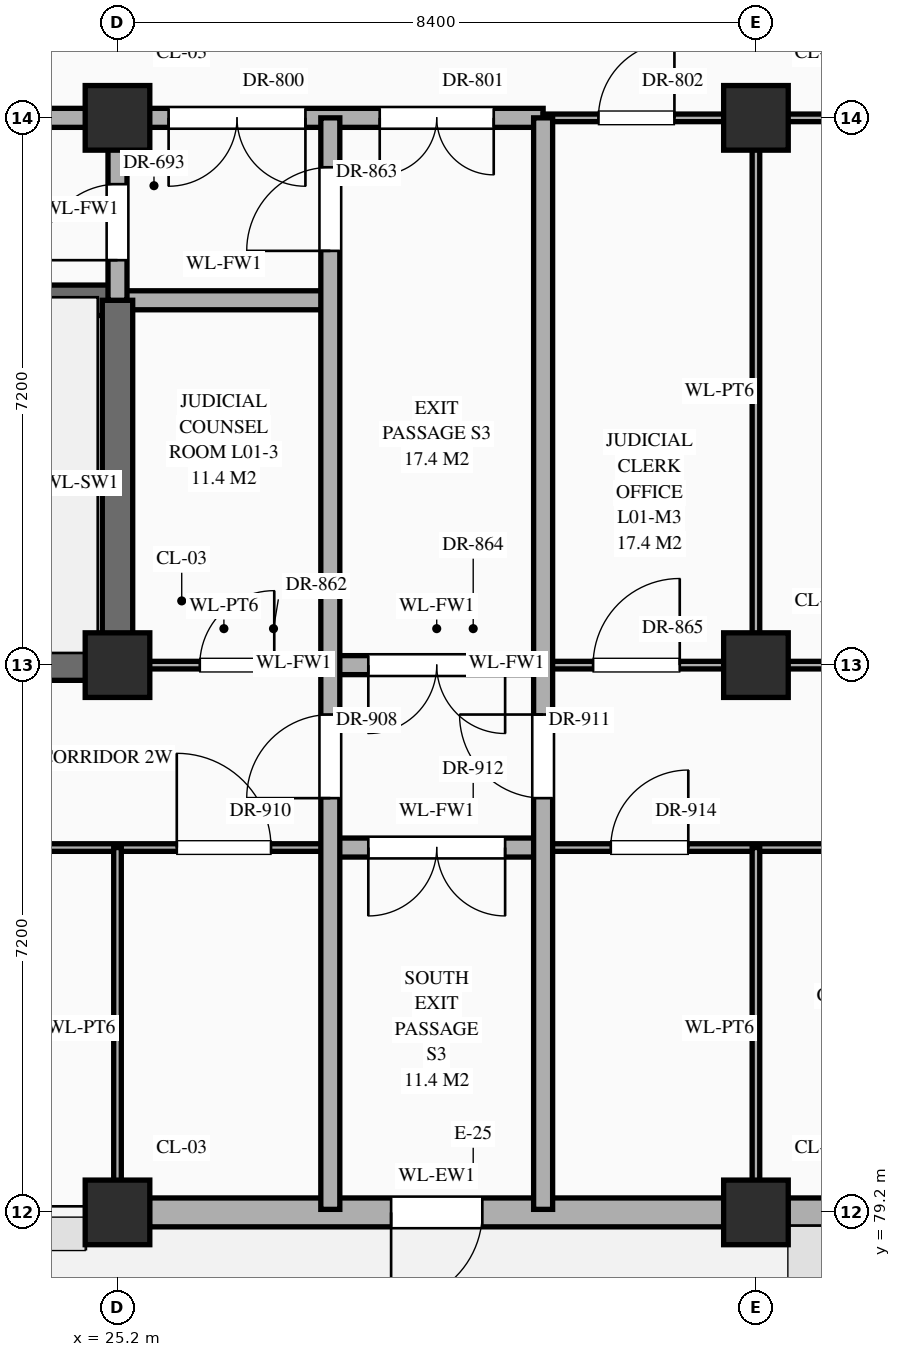
"""IFC4 building model, lengths in metres.
Left out: names, types, materials, properties, quantities, classifications, styles, units other than length and angle.
Written with IfcOpenShell. Run it as: python <this file> out.ifc"""

import sys

from ifc_helpers import new_model, si_unit, direction, frame, frame_2d, origin, origin_2d, place, context, subcontext, project, spatial, rectangle, extrude, element, fill, save


model = new_model("IFC4")
c1 = context("Model", 3, precision=1e-05, world=origin(), true_north=direction((0.0, 1.0)))
c2 = subcontext(c1, "Body", "Model", "MODEL_VIEW")
j1 = project(units=[si_unit("LENGTHUNIT", "METRE"), si_unit("PLANEANGLEUNIT", "RADIAN")], contexts=[c1])
p1 = place(None, origin())
s1 = spatial("IfcSite", under=j1, at=p1, CompositionType="ELEMENT")
p2 = place(p1, origin())
s2 = spatial("IfcBuilding", under=s1, at=p2, CompositionType="ELEMENT")
p3 = place(p2, origin())
s3 = spatial("IfcBuildingStorey", under=s2, at=p3, CompositionType="ELEMENT", Elevation=0.0)
for number, where, z_axis, x_axis in (
    (1, (25.2, 79.2, 0.0), (0.0, 0.0, 1.0), (1.0, 0.0, 0.0)),
    (2, (25.2, 86.4, 0.0), (0.0, 0.0, 1.0), (1.0, 0.0, 0.0)),
    (3, (25.2, 93.6, 0.0), (0.0, 0.0, 1.0), (1.0, 0.0, 0.0)),
    (4, (33.6, 79.2, 0.0), (0.0, 0.0, 1.0), (1.0, 0.0, 0.0)),
    (5, (33.6, 86.4, 0.0), (0.0, 0.0, 1.0), (1.0, 0.0, 0.0)),
    (6, (33.6, 93.6, 0.0), (0.0, 0.0, 1.0), (1.0, 0.0, 0.0)),
):
    element("IfcColumn", number, at=place(p3, frame(where, z_axis=z_axis, x_axis=x_axis)), inside=s3, PredefinedType="COLUMN", context=c2, shape_type="SweptSolid", body=[
        extrude(rectangle(XDim=0.85, YDim=0.85, at=origin_2d()), origin(), (0.0, 0.0, 1.0), 5.4),
    ])
p4 = place(p3, frame((25.62, 79.2, 0.0), z_axis=(0.0, 0.0, 1.0), x_axis=(1.0, 0.0, 0.0)))
e7 = element("IfcWall", 7, at=p4, inside=s3, PredefinedType="STANDARD", context=c2, shape_type="SweptSolid", body=[
    extrude(rectangle(XDim=7.56, YDim=0.38, at=frame_2d((3.78, 0.0))), origin(), (0.0, 0.0, 1.0), 4.47),
])
p5 = place(p4, frame((3.18, 0.0, 0.0)))
e8 = element("IfcOpeningElement", 8, at=p5, cuts=e7, PredefinedType="OPENING", context=c2, shape_type="SweptSolid", body=[
    extrude(rectangle(XDim=1.2, YDim=2.2, at=frame_2d((0.6, 1.1))), frame((0.0, 0.202, 0.0), z_axis=(0.0, -1.0, 0.0), x_axis=(1.0, 0.0, 0.0)), (0.0, 0.0, 1.0), 0.404),
])
p6 = place(p3, frame((34.02, 79.2, 0.0), z_axis=(0.0, 0.0, 1.0), x_axis=(1.0, 0.0, 0.0)))
e9 = element("IfcWall", 9, at=p6, inside=s3, PredefinedType="STANDARD", context=c2, shape_type="SweptSolid", body=[
    extrude(rectangle(XDim=7.56, YDim=0.38, at=frame_2d((3.78, 0.0))), origin(), (0.0, 0.0, 1.0), 4.47),
])
p7 = place(p6, frame((2.58, 0.0, 0.0)))
e10 = element("IfcOpeningElement", 10, at=p7, cuts=e9, PredefinedType="OPENING", context=c2, shape_type="SweptSolid", body=[
    extrude(rectangle(XDim=2.4, YDim=2.4, at=frame_2d((1.2, 1.2))), frame((0.0, 0.202, 0.0), z_axis=(0.0, -1.0, 0.0), x_axis=(1.0, 0.0, 0.0)), (0.0, 0.0, 1.0), 0.404),
])
p8 = place(p3, frame((16.8, 84.0, 0.0), z_axis=(0.0, 0.0, 1.0), x_axis=(1.0, 0.0, 0.0)))
e11 = element("IfcWall", 11, at=p8, inside=s3, PredefinedType="STANDARD", context=c2, shape_type="SweptSolid", body=[
    extrude(rectangle(XDim=11.2, YDim=0.1, at=frame_2d((5.6, 0.0))), origin(), (0.0, 0.0, 1.0), 5.12),
])
p9 = place(p8, frame((3.6, 0.0, 0.0)))
e12 = element("IfcOpeningElement", 12, at=p9, cuts=e11, PredefinedType="OPENING", context=c2, shape_type="SweptSolid", body=[
    extrude(rectangle(XDim=1.2, YDim=2.35, at=frame_2d((0.6, 1.175))), frame((0.0, 0.062, 0.0), z_axis=(0.0, -1.0, 0.0), x_axis=(1.0, 0.0, 0.0)), (0.0, 0.0, 1.0), 0.124),
])
p10 = place(p8, frame((9.18, 0.0, 0.0)))
e13 = element("IfcOpeningElement", 13, at=p10, cuts=e11, PredefinedType="OPENING", context=c2, shape_type="SweptSolid", body=[
    extrude(rectangle(XDim=1.24, YDim=2.3, at=frame_2d((0.62, 1.15))), frame((0.0, 0.062, 0.0), z_axis=(0.0, -1.0, 0.0), x_axis=(1.0, 0.0, 0.0)), (0.0, 0.0, 1.0), 0.124),
])
p11 = place(p3, frame((28.0, 84.0, 0.0), z_axis=(0.0, 0.0, 1.0), x_axis=(1.0, 0.0, 0.0)))
e14 = element("IfcWall", 14, at=p11, inside=s3, PredefinedType="STANDARD", context=c2, shape_type="SweptSolid", body=[
    extrude(rectangle(XDim=2.8, YDim=0.25, at=frame_2d((1.4, 0.0))), origin(), (0.0, 0.0, 1.0), 5.12),
])
p12 = place(p11, frame((0.5, 0.0, 0.0)))
e15 = element("IfcOpeningElement", 15, at=p12, cuts=e14, PredefinedType="OPENING", context=c2, shape_type="SweptSolid", body=[
    extrude(rectangle(XDim=1.8, YDim=2.35, at=frame_2d((0.9, 1.175))), frame((0.0, 0.137, 0.0), z_axis=(0.0, -1.0, 0.0), x_axis=(1.0, 0.0, 0.0)), (0.0, 0.0, 1.0), 0.274),
])
p13 = place(p3, frame((30.8, 84.0, 0.0), z_axis=(0.0, 0.0, 1.0), x_axis=(1.0, 0.0, 0.0)))
e16 = element("IfcWall", 16, at=p13, inside=s3, PredefinedType="STANDARD", context=c2, shape_type="SweptSolid", body=[
    extrude(rectangle(XDim=22.4, YDim=0.1, at=frame_2d((11.2, 0.0))), origin(), (0.0, 0.0, 1.0), 5.12),
])
p14 = place(p13, frame((0.89, 0.0, 0.0)))
e17 = element("IfcOpeningElement", 17, at=p14, cuts=e16, PredefinedType="OPENING", context=c2, shape_type="SweptSolid", body=[
    extrude(rectangle(XDim=1.02, YDim=2.4, at=frame_2d((0.51, 1.2))), frame((0.0, 0.062, 0.0), z_axis=(0.0, -1.0, 0.0), x_axis=(1.0, 0.0, 0.0)), (0.0, 0.0, 1.0), 0.124),
])
p15 = place(p13, frame((10.475, 0.0, 0.0)))
e18 = element("IfcOpeningElement", 18, at=p15, cuts=e16, PredefinedType="OPENING", context=c2, shape_type="SweptSolid", body=[
    extrude(rectangle(XDim=1.45, YDim=2.3, at=frame_2d((0.725, 1.15))), frame((0.0, 0.062, 0.0), z_axis=(0.0, -1.0, 0.0), x_axis=(1.0, 0.0, 0.0)), (0.0, 0.0, 1.0), 0.124),
])
p16 = place(p13, frame((20.55, 0.0, 0.0)))
e19 = element("IfcOpeningElement", 19, at=p16, cuts=e16, PredefinedType="OPENING", context=c2, shape_type="SweptSolid", body=[
    extrude(rectangle(XDim=0.9, YDim=2.15, at=frame_2d((0.45, 1.075))), frame((0.0, 0.062, 0.0), z_axis=(0.0, -1.0, 0.0), x_axis=(1.0, 0.0, 0.0)), (0.0, 0.0, 1.0), 0.124),
])
p17 = place(p3, frame((16.8, 86.4, 0.0), z_axis=(0.0, 0.0, 1.0), x_axis=(1.0, 0.0, 0.0)))
e20 = element("IfcWall", 20, at=p17, inside=s3, PredefinedType="SHEAR", context=c2, shape_type="SweptSolid", body=[
    extrude(rectangle(XDim=8.4, YDim=0.4, at=frame_2d((4.2, 0.0))), origin(), (0.0, 0.0, 1.0), 5.12),
])
p18 = place(p3, frame((25.2, 86.4, 0.0), z_axis=(0.0, 0.0, 1.0), x_axis=(1.0, 0.0, 0.0)))
e21 = element("IfcWall", 21, at=p18, inside=s3, PredefinedType="STANDARD", context=c2, shape_type="SweptSolid", body=[
    extrude(rectangle(XDim=2.8, YDim=0.1, at=frame_2d((1.4, 0.0))), origin(), (0.0, 0.0, 1.0), 4.27),
])
p19 = place(p18, frame((1.083, 0.0, 0.0)))
e22 = element("IfcOpeningElement", 22, at=p19, cuts=e21, PredefinedType="OPENING", context=c2, shape_type="SweptSolid", body=[
    extrude(rectangle(XDim=0.98, YDim=2.35, at=frame_2d((0.49, 1.175))), frame((0.0, 0.062, 0.0), z_axis=(0.0, -1.0, 0.0), x_axis=(1.0, 0.0, 0.0)), (0.0, 0.0, 1.0), 0.124),
])
p20 = place(p3, frame((28.0, 86.4, 0.0), z_axis=(0.0, 0.0, 1.0), x_axis=(1.0, 0.0, 0.0)))
e23 = element("IfcWall", 23, at=p20, inside=s3, PredefinedType="STANDARD", context=c2, shape_type="SweptSolid", body=[
    extrude(rectangle(XDim=2.8, YDim=0.25, at=frame_2d((1.4, 0.0))), origin(), (0.0, 0.0, 1.0), 4.27),
])
p21 = place(p20, frame((0.5, 0.0, 0.0)))
e24 = element("IfcOpeningElement", 24, at=p21, cuts=e23, PredefinedType="OPENING", context=c2, shape_type="SweptSolid", body=[
    extrude(rectangle(XDim=1.8, YDim=2.35, at=frame_2d((0.9, 1.175))), frame((0.0, 0.137, 0.0), z_axis=(0.0, -1.0, 0.0), x_axis=(1.0, 0.0, 0.0)), (0.0, 0.0, 1.0), 0.274),
])
p22 = place(p3, frame((30.8, 86.4, 0.0), z_axis=(0.0, 0.0, 1.0), x_axis=(1.0, 0.0, 0.0)))
e25 = element("IfcWall", 25, at=p22, inside=s3, PredefinedType="STANDARD", context=c2, shape_type="SweptSolid", body=[
    extrude(rectangle(XDim=11.2, YDim=0.1, at=frame_2d((5.6, 0.0))), origin(), (0.0, 0.0, 1.0), 4.27),
])
p23 = place(p22, frame((0.657, 0.0, 0.0)))
e26 = element("IfcOpeningElement", 26, at=p23, cuts=e25, PredefinedType="OPENING", context=c2, shape_type="SweptSolid", body=[
    extrude(rectangle(XDim=1.14, YDim=2.4, at=frame_2d((0.57, 1.2))), frame((0.0, 0.062, 0.0), z_axis=(0.0, -1.0, 0.0), x_axis=(1.0, 0.0, 0.0)), (0.0, 0.0, 1.0), 0.124),
])
p24 = place(p22, frame((6.55, 0.0, 0.0)))
e27 = element("IfcOpeningElement", 27, at=p24, cuts=e25, PredefinedType="OPENING", context=c2, shape_type="SweptSolid", body=[
    extrude(rectangle(XDim=0.9, YDim=2.15, at=frame_2d((0.45, 1.075))), frame((0.0, 0.062, 0.0), z_axis=(0.0, -1.0, 0.0), x_axis=(1.0, 0.0, 0.0)), (0.0, 0.0, 1.0), 0.124),
])
p25 = place(p3, frame((16.8, 91.2, 0.0), z_axis=(0.0, 0.0, 1.0), x_axis=(1.0, 0.0, 0.0)))
e28 = element("IfcWall", 28, at=p25, inside=s3, PredefinedType="SHEAR", context=c2, shape_type="SweptSolid", body=[
    extrude(rectangle(XDim=8.4, YDim=0.4, at=frame_2d((4.2, 0.0))), origin(), (0.0, 0.0, 1.0), 5.12),
])
p26 = place(p25, frame((0.65, 0.0, 0.0)))
e29 = element("IfcOpeningElement", 29, at=p26, cuts=e28, PredefinedType="OPENING", context=c2, shape_type="SweptSolid", body=[
    extrude(rectangle(XDim=1.1, YDim=2.2, at=frame_2d((0.55, 1.1))), frame((0.0, 0.212, 0.0), z_axis=(0.0, -1.0, 0.0), x_axis=(1.0, 0.0, 0.0)), (0.0, 0.0, 1.0), 0.424),
])
p27 = place(p3, frame((25.2, 91.2, 0.0), z_axis=(0.0, 0.0, 1.0), x_axis=(1.0, 0.0, 0.0)))
e30 = element("IfcWall", 30, at=p27, inside=s3, PredefinedType="STANDARD", context=c2, shape_type="SweptSolid", body=[
    extrude(rectangle(XDim=2.8, YDim=0.25, at=frame_2d((1.4, 0.0))), origin(), (0.0, 0.0, 1.0), 5.12),
])
p28 = place(p3, frame((16.8, 93.6, 0.0), z_axis=(0.0, 0.0, 1.0), x_axis=(1.0, 0.0, 0.0)))
e31 = element("IfcWall", 31, at=p28, inside=s3, PredefinedType="STANDARD", context=c2, shape_type="SweptSolid", body=[
    extrude(rectangle(XDim=14.0, YDim=0.25, at=frame_2d((7.0, 0.0))), origin(), (0.0, 0.0, 1.0), 4.27),
])
p29 = place(p28, frame((3.3, 0.0, 0.0)))
e32 = element("IfcOpeningElement", 32, at=p29, cuts=e31, PredefinedType="OPENING", context=c2, shape_type="SweptSolid", body=[
    extrude(rectangle(XDim=1.8, YDim=2.35, at=frame_2d((0.9, 1.175))), frame((0.0, 0.137, 0.0), z_axis=(0.0, -1.0, 0.0), x_axis=(1.0, 0.0, 0.0)), (0.0, 0.0, 1.0), 0.274),
])
p30 = place(p28, frame((9.073, 0.0, 0.0)))
e33 = element("IfcOpeningElement", 33, at=p30, cuts=e31, PredefinedType="OPENING", context=c2, shape_type="SweptSolid", body=[
    extrude(rectangle(XDim=1.8, YDim=2.35, at=frame_2d((0.9, 1.175))), frame((0.0, 0.137, 0.0), z_axis=(0.0, -1.0, 0.0), x_axis=(1.0, 0.0, 0.0)), (0.0, 0.0, 1.0), 0.274),
])
p31 = place(p28, frame((11.85, 0.0, 0.0)))
e34 = element("IfcOpeningElement", 34, at=p31, cuts=e31, PredefinedType="OPENING", context=c2, shape_type="SweptSolid", body=[
    extrude(rectangle(XDim=1.5, YDim=2.25, at=frame_2d((0.75, 1.125))), frame((0.0, 0.137, 0.0), z_axis=(0.0, -1.0, 0.0), x_axis=(1.0, 0.0, 0.0)), (0.0, 0.0, 1.0), 0.274),
])
p32 = place(p3, frame((30.8, 93.6, 0.0), z_axis=(0.0, 0.0, 1.0), x_axis=(1.0, 0.0, 0.0)))
e35 = element("IfcWall", 35, at=p32, inside=s3, PredefinedType="STANDARD", context=c2, shape_type="SweptSolid", body=[
    extrude(rectangle(XDim=11.2, YDim=0.1, at=frame_2d((5.6, 0.0))), origin(), (0.0, 0.0, 1.0), 4.27),
])
p33 = place(p32, frame((0.728, 0.0, 0.0)))
e36 = element("IfcOpeningElement", 36, at=p33, cuts=e35, PredefinedType="OPENING", context=c2, shape_type="SweptSolid", body=[
    extrude(rectangle(XDim=1.0, YDim=2.25, at=frame_2d((0.5, 1.125))), frame((0.0, 0.062, 0.0), z_axis=(0.0, -1.0, 0.0), x_axis=(1.0, 0.0, 0.0)), (0.0, 0.0, 1.0), 0.124),
])
p34 = place(p32, frame((6.48, 0.0, 0.0)))
e37 = element("IfcOpeningElement", 37, at=p34, cuts=e35, PredefinedType="OPENING", context=c2, shape_type="SweptSolid", body=[
    extrude(rectangle(XDim=1.04, YDim=2.2, at=frame_2d((0.52, 1.1))), frame((0.0, 0.062, 0.0), z_axis=(0.0, -1.0, 0.0), x_axis=(1.0, 0.0, 0.0)), (0.0, 0.0, 1.0), 0.124),
])
p35 = place(p3, frame((25.2, 79.24, 0.0), z_axis=(0.0, 0.0, 1.0), x_axis=(0.0, 1.0, 0.0)))
e38 = element("IfcWall", 38, at=p35, inside=s3, PredefinedType="STANDARD", context=c2, shape_type="SweptSolid", body=[
    extrude(rectangle(XDim=4.76, YDim=0.1, at=frame_2d((2.38, 0.0))), origin(), (0.0, 0.0, 1.0), 4.37),
])
p36 = place(p3, frame((25.2, 86.4, 0.0), z_axis=(0.0, 0.0, 1.0), x_axis=(0.0, 1.0, 0.0)))
e39 = element("IfcWall", 39, at=p36, inside=s3, PredefinedType="SHEAR", context=c2, shape_type="SweptSolid", body=[
    extrude(rectangle(XDim=4.8, YDim=0.4, at=frame_2d((2.4, 0.0))), origin(), (0.0, 0.0, 1.0), 5.12),
])
p37 = place(p3, frame((25.2, 91.2, 0.0), z_axis=(0.0, 0.0, 1.0), x_axis=(0.0, 1.0, 0.0)))
e40 = element("IfcWall", 40, at=p37, inside=s3, PredefinedType="STANDARD", context=c2, shape_type="SweptSolid", body=[
    extrude(rectangle(XDim=2.4, YDim=0.25, at=frame_2d((1.2, 0.0))), origin(), (0.0, 0.0, 1.0), 4.37),
])
p38 = place(p37, frame((0.528, 0.0, 0.0)))
e41 = element("IfcOpeningElement", 41, at=p38, cuts=e40, PredefinedType="OPENING", context=c2, shape_type="SweptSolid", body=[
    extrude(rectangle(XDim=1.0, YDim=2.2, at=frame_2d((0.5, 1.1))), frame((0.0, 0.137, 0.0), z_axis=(0.0, -1.0, 0.0), x_axis=(1.0, 0.0, 0.0)), (0.0, 0.0, 1.0), 0.274),
])
p39 = place(p3, frame((28.0, 79.24, 0.0), z_axis=(0.0, 0.0, 1.0), x_axis=(0.0, 1.0, 0.0)))
e42 = element("IfcWall", 42, at=p39, inside=s3, PredefinedType="STANDARD", context=c2, shape_type="SweptSolid", body=[
    extrude(rectangle(XDim=14.36, YDim=0.25, at=frame_2d((7.18, 0.0))), origin(), (0.0, 0.0, 1.0), 5.12),
])
p40 = place(p39, frame((12.61, 0.0, 0.0)))
e43 = element("IfcOpeningElement", 43, at=p40, cuts=e42, PredefinedType="OPENING", context=c2, shape_type="SweptSolid", body=[
    extrude(rectangle(XDim=1.1, YDim=2.2, at=frame_2d((0.55, 1.1))), frame((0.0, 0.137, 0.0), z_axis=(0.0, -1.0, 0.0), x_axis=(1.0, 0.0, 0.0)), (0.0, 0.0, 1.0), 0.274),
])
p41 = place(p39, frame((5.41, 0.0, 0.0)))
e44 = element("IfcOpeningElement", 44, at=p41, cuts=e42, PredefinedType="OPENING", context=c2, shape_type="SweptSolid", body=[
    extrude(rectangle(XDim=1.1, YDim=2.2, at=frame_2d((0.55, 1.1))), frame((0.0, 0.137, 0.0), z_axis=(0.0, -1.0, 0.0), x_axis=(1.0, 0.0, 0.0)), (0.0, 0.0, 1.0), 0.274),
])
p42 = place(p3, frame((30.8, 79.24, 0.0), z_axis=(0.0, 0.0, 1.0), x_axis=(0.0, 1.0, 0.0)))
e45 = element("IfcWall", 45, at=p42, inside=s3, PredefinedType="STANDARD", context=c2, shape_type="SweptSolid", body=[
    extrude(rectangle(XDim=14.36, YDim=0.25, at=frame_2d((7.18, 0.0))), origin(), (0.0, 0.0, 1.0), 5.12),
])
p43 = place(p42, frame((5.41, 0.0, 0.0)))
e46 = element("IfcOpeningElement", 46, at=p43, cuts=e45, PredefinedType="OPENING", context=c2, shape_type="SweptSolid", body=[
    extrude(rectangle(XDim=1.1, YDim=2.2, at=frame_2d((0.55, 1.1))), frame((0.0, 0.137, 0.0), z_axis=(0.0, -1.0, 0.0), x_axis=(1.0, 0.0, 0.0)), (0.0, 0.0, 1.0), 0.274),
])
p44 = place(p3, frame((33.6, 79.24, 0.0), z_axis=(0.0, 0.0, 1.0), x_axis=(0.0, 1.0, 0.0)))
e47 = element("IfcWall", 47, at=p44, inside=s3, PredefinedType="STANDARD", context=c2, shape_type="SweptSolid", body=[
    extrude(rectangle(XDim=4.76, YDim=0.1, at=frame_2d((2.38, 0.0))), origin(), (0.0, 0.0, 1.0), 4.37),
])
p45 = place(p3, frame((33.6, 86.4, 0.0), z_axis=(0.0, 0.0, 1.0), x_axis=(0.0, 1.0, 0.0)))
e48 = element("IfcWall", 48, at=p45, inside=s3, PredefinedType="STANDARD", context=c2, shape_type="SweptSolid", body=[
    extrude(rectangle(XDim=7.2, YDim=0.1, at=frame_2d((3.6, 0.0))), origin(), (0.0, 0.0, 1.0), 4.37),
])
p46 = place(p5, frame((1.2, 0.0, 0.0), z_axis=(0.0, 0.0, 1.0), x_axis=(-1.0, 0.0, 0.0)))
e49 = element("IfcDoor", 49, at=p46, inside=s3, OperationType="SINGLE_SWING_RIGHT", PredefinedType="DOOR", context=c2, shape_type="SweptSolid", body=[
    extrude(rectangle(XDim=1.2, YDim=2.2, at=frame_2d((0.6, 1.1))), frame((0.0, 0.025, 0.0), z_axis=(0.0, -1.0, 0.0), x_axis=(1.0, 0.0, 0.0)), (0.0, 0.0, 1.0), 0.05),
])
fill(e8, e49)
p47 = place(p38, origin())
e50 = element("IfcDoor", 50, at=p47, inside=s3, OperationType="SINGLE_SWING_LEFT", PredefinedType="DOOR", context=c2, shape_type="SweptSolid", body=[
    extrude(rectangle(XDim=1.0, YDim=2.2, at=frame_2d((0.5, 1.1))), frame((0.0, 0.025, 0.0), z_axis=(0.0, -1.0, 0.0), x_axis=(1.0, 0.0, 0.0)), (0.0, 0.0, 1.0), 0.05),
])
fill(e41, e50)
p48 = place(p30, frame((1.8, 0.0, 0.0), z_axis=(0.0, 0.0, 1.0), x_axis=(-1.0, 0.0, 0.0)))
e51 = element("IfcDoor", 51, at=p48, inside=s3, OperationType="DOUBLE_DOOR_SINGLE_SWING", PredefinedType="DOOR", context=c2, shape_type="SweptSolid", body=[
    extrude(rectangle(XDim=1.8, YDim=2.35, at=frame_2d((0.9, 1.175))), frame((0.0, 0.025, 0.0), z_axis=(0.0, -1.0, 0.0), x_axis=(1.0, 0.0, 0.0)), (0.0, 0.0, 1.0), 0.05),
])
fill(e33, e51)
p49 = place(p31, frame((1.5, 0.0, 0.0), z_axis=(0.0, 0.0, 1.0), x_axis=(-1.0, 0.0, 0.0)))
e52 = element("IfcDoor", 52, at=p49, inside=s3, OperationType="DOUBLE_DOOR_SINGLE_SWING", PredefinedType="DOOR", context=c2, shape_type="SweptSolid", body=[
    extrude(rectangle(XDim=1.5, YDim=2.25, at=frame_2d((0.75, 1.125))), frame((0.0, 0.025, 0.0), z_axis=(0.0, -1.0, 0.0), x_axis=(1.0, 0.0, 0.0)), (0.0, 0.0, 1.0), 0.05),
])
fill(e34, e52)
p50 = place(p33, origin())
e53 = element("IfcDoor", 53, at=p50, inside=s3, OperationType="SINGLE_SWING_RIGHT", PredefinedType="DOOR", context=c2, shape_type="SweptSolid", body=[
    extrude(rectangle(XDim=1.0, YDim=2.25, at=frame_2d((0.5, 1.125))), frame((0.0, 0.025, 0.0), z_axis=(0.0, -1.0, 0.0), x_axis=(1.0, 0.0, 0.0)), (0.0, 0.0, 1.0), 0.05),
])
fill(e36, e53)
p51 = place(p19, origin())
e54 = element("IfcDoor", 54, at=p51, inside=s3, OperationType="SINGLE_SWING_RIGHT", PredefinedType="DOOR", context=c2, shape_type="SweptSolid", body=[
    extrude(rectangle(XDim=0.98, YDim=2.35, at=frame_2d((0.49, 1.175))), frame((0.0, 0.025, 0.0), z_axis=(0.0, -1.0, 0.0), x_axis=(1.0, 0.0, 0.0)), (0.0, 0.0, 1.0), 0.05),
])
fill(e22, e54)
p52 = place(p40, origin())
e55 = element("IfcDoor", 55, at=p52, inside=s3, OperationType="SINGLE_SWING_LEFT", PredefinedType="DOOR", context=c2, shape_type="SweptSolid", body=[
    extrude(rectangle(XDim=1.1, YDim=2.2, at=frame_2d((0.55, 1.1))), frame((0.0, 0.025, 0.0), z_axis=(0.0, -1.0, 0.0), x_axis=(1.0, 0.0, 0.0)), (0.0, 0.0, 1.0), 0.05),
])
fill(e43, e55)
p53 = place(p21, frame((1.8, 0.0, 0.0), z_axis=(0.0, 0.0, 1.0), x_axis=(-1.0, 0.0, 0.0)))
e56 = element("IfcDoor", 56, at=p53, inside=s3, OperationType="DOUBLE_DOOR_SINGLE_SWING", PredefinedType="DOOR", context=c2, shape_type="SweptSolid", body=[
    extrude(rectangle(XDim=1.8, YDim=2.35, at=frame_2d((0.9, 1.175))), frame((0.0, 0.025, 0.0), z_axis=(0.0, -1.0, 0.0), x_axis=(1.0, 0.0, 0.0)), (0.0, 0.0, 1.0), 0.05),
])
fill(e24, e56)
p54 = place(p23, origin())
e57 = element("IfcDoor", 57, at=p54, inside=s3, OperationType="SINGLE_SWING_RIGHT", PredefinedType="DOOR", context=c2, shape_type="SweptSolid", body=[
    extrude(rectangle(XDim=1.14, YDim=2.4, at=frame_2d((0.57, 1.2))), frame((0.0, 0.025, 0.0), z_axis=(0.0, -1.0, 0.0), x_axis=(1.0, 0.0, 0.0)), (0.0, 0.0, 1.0), 0.05),
])
fill(e26, e57)
p55 = place(p41, origin())
e58 = element("IfcDoor", 58, at=p55, inside=s3, OperationType="SINGLE_SWING_LEFT", PredefinedType="DOOR", context=c2, shape_type="SweptSolid", body=[
    extrude(rectangle(XDim=1.1, YDim=2.2, at=frame_2d((0.55, 1.1))), frame((0.0, 0.025, 0.0), z_axis=(0.0, -1.0, 0.0), x_axis=(1.0, 0.0, 0.0)), (0.0, 0.0, 1.0), 0.05),
])
fill(e44, e58)
p56 = place(p10, origin())
e59 = element("IfcDoor", 59, at=p56, inside=s3, OperationType="SINGLE_SWING_LEFT", PredefinedType="DOOR", context=c2, shape_type="SweptSolid", body=[
    extrude(rectangle(XDim=1.24, YDim=2.3, at=frame_2d((0.62, 1.15))), frame((0.0, 0.025, 0.0), z_axis=(0.0, -1.0, 0.0), x_axis=(1.0, 0.0, 0.0)), (0.0, 0.0, 1.0), 0.05),
])
fill(e13, e59)
p57 = place(p43, origin())
e60 = element("IfcDoor", 60, at=p57, inside=s3, OperationType="SINGLE_SWING_RIGHT", PredefinedType="DOOR", context=c2, shape_type="SweptSolid", body=[
    extrude(rectangle(XDim=1.1, YDim=2.2, at=frame_2d((0.55, 1.1))), frame((0.0, 0.025, 0.0), z_axis=(0.0, -1.0, 0.0), x_axis=(1.0, 0.0, 0.0)), (0.0, 0.0, 1.0), 0.05),
])
fill(e46, e60)
p58 = place(p12, frame((1.8, 0.0, 0.0), z_axis=(0.0, 0.0, 1.0), x_axis=(-1.0, 0.0, 0.0)))
e61 = element("IfcDoor", 61, at=p58, inside=s3, OperationType="DOUBLE_DOOR_SINGLE_SWING", PredefinedType="DOOR", context=c2, shape_type="SweptSolid", body=[
    extrude(rectangle(XDim=1.8, YDim=2.35, at=frame_2d((0.9, 1.175))), frame((0.0, 0.025, 0.0), z_axis=(0.0, -1.0, 0.0), x_axis=(1.0, 0.0, 0.0)), (0.0, 0.0, 1.0), 0.05),
])
fill(e15, e61)
p59 = place(p14, origin())
e62 = element("IfcDoor", 62, at=p59, inside=s3, OperationType="SINGLE_SWING_RIGHT", PredefinedType="DOOR", context=c2, shape_type="SweptSolid", body=[
    extrude(rectangle(XDim=1.02, YDim=2.4, at=frame_2d((0.51, 1.2))), frame((0.0, 0.025, 0.0), z_axis=(0.0, -1.0, 0.0), x_axis=(1.0, 0.0, 0.0)), (0.0, 0.0, 1.0), 0.05),
])
fill(e17, e62)
save(model, sys.argv[1])
